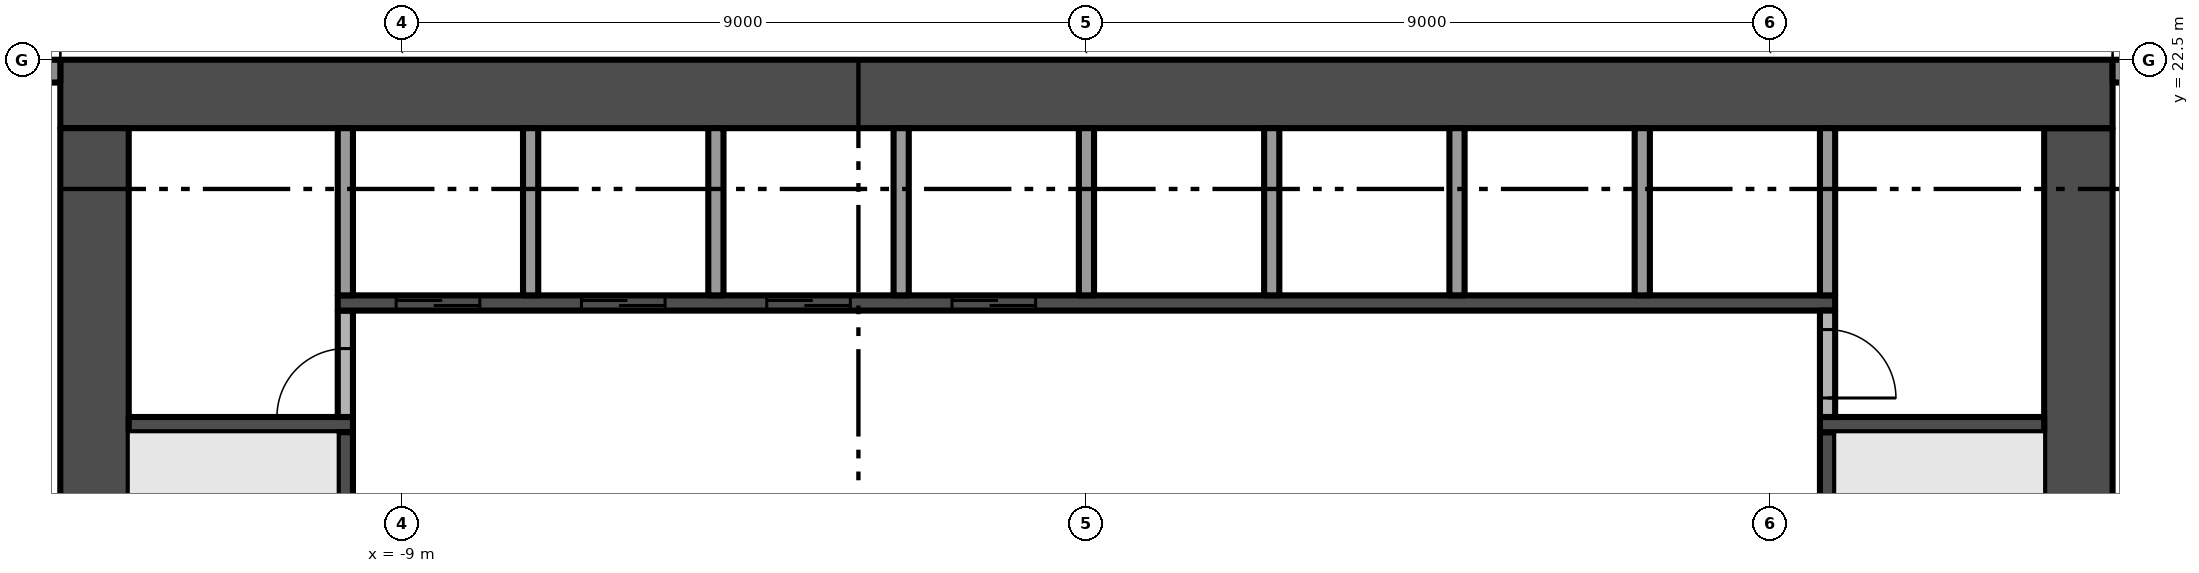
"""IFC4 building model, lengths in metres.
Left out: names, types, materials, properties, quantities, classifications, styles, units other than length and angle.
Written with IfcOpenShell. Run it as: python <this file> out.ifc"""

import sys

from ifc_helpers import new_model, si_unit, direction, frame, frame_2d, origin, place, context, subcontext, project, spatial, rectangle, extrude, element, fill, save


model = new_model("IFC4")
c1 = context("Model", 3, precision=1e-05, world=origin(), true_north=direction((0.0, 1.0)))
c2 = subcontext(c1, "Body", "Model", "MODEL_VIEW")
j1 = project(units=[si_unit("LENGTHUNIT", "METRE"), si_unit("PLANEANGLEUNIT", "RADIAN")], contexts=[c1])
p1 = place(None, origin())
s1 = spatial("IfcSite", under=j1, at=p1, CompositionType="ELEMENT")
p2 = place(p1, origin())
s2 = spatial("IfcBuilding", under=s1, at=p2, CompositionType="ELEMENT")
p3 = place(p2, frame((0.0, 0.0, 96.0)))
s3 = spatial("IfcBuildingStorey", under=s2, at=p3, CompositionType="ELEMENT", Elevation=96.0)
p4 = place(p3, frame((13.05, 5.4, -0.3), z_axis=(0.0, 0.0, 1.0), x_axis=(0.0, 1.0, 0.0)))
e1 = element("IfcWall", 1, at=p4, inside=s3, PredefinedType="SHEAR", context=c2, shape_type="SweptSolid", body=[
    extrude(rectangle(XDim=16.2, YDim=0.9, at=frame_2d((8.1, 0.0))), origin(), (0.0, 0.0, 1.0), 3.8),
])
p5 = place(p4, frame((6.0, 0.0, 0.3)))
e2 = element("IfcOpeningElement", 2, at=p5, cuts=e1, PredefinedType="OPENING", context=c2, shape_type="SweptSolid", body=[
    extrude(rectangle(XDim=1.2, YDim=2.2, at=frame_2d((0.6, 1.1))), frame((0.0, 0.46, 0.0), z_axis=(0.0, -1.0, 0.0), x_axis=(1.0, 0.0, 0.0)), (0.0, 0.0, 1.0), 0.92),
])
p6 = place(p3, frame((13.5, 22.05, -0.3), z_axis=(0.0, 0.0, 1.0), x_axis=(-1.0, 0.0, 0.0)))
e3 = element("IfcWall", 3, at=p6, inside=s3, PredefinedType="SHEAR", context=c2, shape_type="SweptSolid", body=[
    extrude(rectangle(XDim=27.0, YDim=0.9, at=frame_2d((13.5, 0.0))), origin(), (0.0, 0.0, 1.0), 3.8),
])
p7 = place(p3, frame((-13.05, 21.6, -0.3), z_axis=(0.0, 0.0, 1.0), x_axis=(0.0, -1.0, 0.0)))
e4 = element("IfcWall", 4, at=p7, inside=s3, PredefinedType="SHEAR", context=c2, shape_type="SweptSolid", body=[
    extrude(rectangle(XDim=16.2, YDim=0.9, at=frame_2d((8.1, 0.0))), origin(), (0.0, 0.0, 1.0), 3.8),
])
p8 = place(p7, frame((9.0, 0.0, 0.3)))
e5 = element("IfcOpeningElement", 5, at=p8, cuts=e4, PredefinedType="OPENING", context=c2, shape_type="SweptSolid", body=[
    extrude(rectangle(XDim=1.2, YDim=2.2, at=frame_2d((0.6, 1.1))), frame((0.0, 0.46, 0.0), z_axis=(0.0, -1.0, 0.0), x_axis=(1.0, 0.0, 0.0)), (0.0, 0.0, 1.0), 0.92),
])
p9 = place(p3, frame((13.5, 22.35, 0.0), z_axis=(0.0, 0.0, 1.0), x_axis=(1.0, 0.0, 0.0)))
e6 = element("IfcWall", 6, at=p9, inside=s3, PredefinedType="SOLIDWALL", context=c2, shape_type="SweptSolid", body=[
    extrude(rectangle(XDim=3.85, YDim=0.3, at=frame_2d((1.925, 0.0))), origin(), (0.0, 0.0, 1.0), 3.5),
])
p10 = place(p9, frame((0.775, 0.0, 0.0)))
e7 = element("IfcOpeningElement", 7, at=p10, cuts=e6, PredefinedType="OPENING", context=c2, shape_type="SweptSolid", body=[
    extrude(rectangle(XDim=2.775, YDim=2.4, at=frame_2d((1.387, 1.2))), frame((0.0, 0.16, 0.0), z_axis=(0.0, -1.0, 0.0), x_axis=(1.0, 0.0, 0.0)), (0.0, 0.0, 1.0), 0.32),
])
p11 = place(p3, frame((-17.35, 22.35, 0.0), z_axis=(0.0, 0.0, 1.0), x_axis=(1.0, 0.0, 0.0)))
e8 = element("IfcWall", 8, at=p11, inside=s3, PredefinedType="SOLIDWALL", context=c2, shape_type="SweptSolid", body=[
    extrude(rectangle(XDim=3.85, YDim=0.3, at=frame_2d((1.925, 0.0))), origin(), (0.0, 0.0, 1.0), 3.5),
])
p12 = place(p11, frame((0.3, 0.0, 0.45)))
e9 = element("IfcOpeningElement", 9, at=p12, cuts=e8, PredefinedType="OPENING", context=c2, shape_type="SweptSolid", body=[
    extrude(rectangle(XDim=2.775, YDim=2.65, at=frame_2d((1.387, 1.325))), frame((0.0, 0.16, 0.0), z_axis=(0.0, -1.0, 0.0), x_axis=(1.0, 0.0, 0.0)), (0.0, 0.0, 1.0), 0.32),
])
p13 = place(p3, frame((-12.6, 17.7, 0.0), z_axis=(0.0, 0.0, 1.0), x_axis=(1.0, 0.0, 0.0)))
e10 = element("IfcWall", 10, at=p13, inside=s3, PredefinedType="SHEAR", context=c2, shape_type="SweptSolid", body=[
    extrude(rectangle(XDim=2.95, YDim=0.2, at=frame_2d((1.475, 0.0))), origin(), (0.0, 0.0, 1.0), 3.5),
])
p14 = place(p3, frame((-9.75, 16.1, 0.0), z_axis=(0.0, 0.0, 1.0), x_axis=(0.0, 1.0, 0.0)))
e11 = element("IfcWall", 11, at=p14, inside=s3, PredefinedType="SHEAR", context=c2, shape_type="SweptSolid", body=[
    extrude(rectangle(XDim=1.5, YDim=0.2, at=frame_2d((0.75, 0.0))), origin(), (0.0, 0.0, 1.0), 3.5),
])
p15 = place(p3, frame((-9.75, 17.8, 0.0), z_axis=(0.0, 0.0, 1.0), x_axis=(0.0, 1.0, 0.0)))
e12 = element("IfcWall", 12, at=p15, inside=s3, PredefinedType="PARTITIONING", context=c2, shape_type="SweptSolid", body=[
    extrude(rectangle(XDim=1.4, YDim=0.2, at=frame_2d((0.7, 0.0))), origin(), (0.0, 0.0, 1.0), 3.5),
])
p16 = place(p15, origin())
e13 = element("IfcOpeningElement", 13, at=p16, cuts=e12, PredefinedType="OPENING", context=c2, shape_type="SweptSolid", body=[
    extrude(rectangle(XDim=0.9, YDim=2.1, at=frame_2d((0.45, 1.05))), frame((0.0, 0.11, 0.0), z_axis=(0.0, -1.0, 0.0), x_axis=(1.0, 0.0, 0.0)), (0.0, 0.0, 1.0), 0.22),
])
p17 = place(p3, frame((-9.85, 19.3, 0.0), z_axis=(0.0, 0.0, 1.0), x_axis=(1.0, 0.0, 0.0)))
e14 = element("IfcWall", 14, at=p17, inside=s3, PredefinedType="SHEAR", context=c2, shape_type="SweptSolid", body=[
    extrude(rectangle(XDim=19.7, YDim=0.2, at=frame_2d((9.85, 0.0))), origin(), (0.0, 0.0, 1.0), 3.5),
])
p18 = place(p17, frame((0.769, 0.0, 0.0)))
e15 = element("IfcOpeningElement", 15, at=p18, cuts=e14, PredefinedType="OPENING", context=c2, shape_type="SweptSolid", body=[
    extrude(rectangle(XDim=1.1, YDim=2.1, at=frame_2d((0.55, 1.05))), frame((0.0, 0.11, 0.0), z_axis=(0.0, -1.0, 0.0), x_axis=(1.0, 0.0, 0.0)), (0.0, 0.0, 1.0), 0.22),
])
p19 = place(p17, frame((3.206, 0.0, 0.0)))
e16 = element("IfcOpeningElement", 16, at=p19, cuts=e14, PredefinedType="OPENING", context=c2, shape_type="SweptSolid", body=[
    extrude(rectangle(XDim=1.1, YDim=2.1, at=frame_2d((0.55, 1.05))), frame((0.0, 0.11, 0.0), z_axis=(0.0, -1.0, 0.0), x_axis=(1.0, 0.0, 0.0)), (0.0, 0.0, 1.0), 0.22),
])
p20 = place(p17, frame((5.644, 0.0, 0.0)))
e17 = element("IfcOpeningElement", 17, at=p20, cuts=e14, PredefinedType="OPENING", context=c2, shape_type="SweptSolid", body=[
    extrude(rectangle(XDim=1.1, YDim=2.1, at=frame_2d((0.55, 1.05))), frame((0.0, 0.11, 0.0), z_axis=(0.0, -1.0, 0.0), x_axis=(1.0, 0.0, 0.0)), (0.0, 0.0, 1.0), 0.22),
])
p21 = place(p17, frame((8.081, 0.0, 0.0)))
e18 = element("IfcOpeningElement", 18, at=p21, cuts=e14, PredefinedType="OPENING", context=c2, shape_type="SweptSolid", body=[
    extrude(rectangle(XDim=1.1, YDim=2.1, at=frame_2d((0.55, 1.05))), frame((0.0, 0.11, 0.0), z_axis=(0.0, -1.0, 0.0), x_axis=(1.0, 0.0, 0.0)), (0.0, 0.0, 1.0), 0.22),
])
for number, where, z_axis, x_axis in (
    (19, (-9.75, 19.4, 0.0), (0.0, 0.0, 1.0), (0.0, 1.0, 0.0)),
    (20, (-7.312, 19.4, 0.0), (0.0, 0.0, 1.0), (0.0, 1.0, 0.0)),
    (21, (-4.875, 19.4, 0.0), (0.0, 0.0, 1.0), (0.0, 1.0, 0.0)),
    (22, (-2.438, 19.4, 0.0), (0.0, 0.0, 1.0), (0.0, 1.0, 0.0)),
    (23, (0.0, 19.4, 0.0), (0.0, 0.0, 1.0), (0.0, 1.0, 0.0)),
    (24, (2.438, 19.4, 0.0), (0.0, 0.0, 1.0), (0.0, 1.0, 0.0)),
    (25, (4.875, 19.4, 0.0), (0.0, 0.0, 1.0), (0.0, 1.0, 0.0)),
    (26, (7.312, 19.4, 0.0), (0.0, 0.0, 1.0), (0.0, 1.0, 0.0)),
):
    element("IfcWall", number, at=place(p3, frame(where, z_axis=z_axis, x_axis=x_axis)), inside=s3, PredefinedType="PARTITIONING", context=c2, shape_type="SweptSolid", body=[
        extrude(rectangle(XDim=2.2, YDim=0.2, at=frame_2d((1.1, 0.0))), origin(), (0.0, 0.0, 1.0), 3.5),
    ])
p22 = place(p3, frame((9.75, 16.1, 0.0), z_axis=(0.0, 0.0, 1.0), x_axis=(0.0, 1.0, 0.0)))
e27 = element("IfcWall", 27, at=p22, inside=s3, PredefinedType="SHEAR", context=c2, shape_type="SweptSolid", body=[
    extrude(rectangle(XDim=1.5, YDim=0.2, at=frame_2d((0.75, 0.0))), origin(), (0.0, 0.0, 1.0), 3.5),
])
p23 = place(p3, frame((9.65, 17.7, 0.0), z_axis=(0.0, 0.0, 1.0), x_axis=(1.0, 0.0, 0.0)))
e28 = element("IfcWall", 28, at=p23, inside=s3, PredefinedType="SHEAR", context=c2, shape_type="SweptSolid", body=[
    extrude(rectangle(XDim=2.95, YDim=0.2, at=frame_2d((1.475, 0.0))), origin(), (0.0, 0.0, 1.0), 3.5),
])
p24 = place(p3, frame((9.75, 19.2, 0.0), z_axis=(0.0, 0.0, 1.0), x_axis=(0.0, -1.0, 0.0)))
e29 = element("IfcWall", 29, at=p24, inside=s3, PredefinedType="PARTITIONING", context=c2, shape_type="SweptSolid", body=[
    extrude(rectangle(XDim=1.4, YDim=0.2, at=frame_2d((0.7, 0.0))), origin(), (0.0, 0.0, 1.0), 3.5),
])
p25 = place(p24, frame((0.25, 0.0, 0.0)))
e30 = element("IfcOpeningElement", 30, at=p25, cuts=e29, PredefinedType="OPENING", context=c2, shape_type="SweptSolid", body=[
    extrude(rectangle(XDim=0.9, YDim=2.1, at=frame_2d((0.45, 1.05))), frame((0.0, 0.11, 0.0), z_axis=(0.0, -1.0, 0.0), x_axis=(1.0, 0.0, 0.0)), (0.0, 0.0, 1.0), 0.22),
])
p26 = place(p3, frame((9.75, 19.4, 0.0), z_axis=(0.0, 0.0, 1.0), x_axis=(0.0, 1.0, 0.0)))
e31 = element("IfcWall", 31, at=p26, inside=s3, PredefinedType="PARTITIONING", context=c2, shape_type="SweptSolid", body=[
    extrude(rectangle(XDim=2.2, YDim=0.2, at=frame_2d((1.1, 0.0))), origin(), (0.0, 0.0, 1.0), 3.5),
])
p27 = place(p18, origin())
e32 = element("IfcDoor", 32, at=p27, inside=s3, OperationType="SLIDING_TO_LEFT", PredefinedType="DOOR", context=c2, shape_type="SweptSolid", body=[
    extrude(rectangle(XDim=1.1, YDim=2.1, at=frame_2d((0.55, 1.05))), frame((0.0, 0.025, 0.0), z_axis=(0.0, -1.0, 0.0), x_axis=(1.0, 0.0, 0.0)), (0.0, 0.0, 1.0), 0.05),
])
fill(e15, e32)
p28 = place(p19, origin())
e33 = element("IfcDoor", 33, at=p28, inside=s3, OperationType="SLIDING_TO_LEFT", PredefinedType="DOOR", context=c2, shape_type="SweptSolid", body=[
    extrude(rectangle(XDim=1.1, YDim=2.1, at=frame_2d((0.55, 1.05))), frame((0.0, 0.025, 0.0), z_axis=(0.0, -1.0, 0.0), x_axis=(1.0, 0.0, 0.0)), (0.0, 0.0, 1.0), 0.05),
])
fill(e16, e33)
p29 = place(p20, origin())
e34 = element("IfcDoor", 34, at=p29, inside=s3, OperationType="SLIDING_TO_LEFT", PredefinedType="DOOR", context=c2, shape_type="SweptSolid", body=[
    extrude(rectangle(XDim=1.1, YDim=2.1, at=frame_2d((0.55, 1.05))), frame((0.0, 0.025, 0.0), z_axis=(0.0, -1.0, 0.0), x_axis=(1.0, 0.0, 0.0)), (0.0, 0.0, 1.0), 0.05),
])
fill(e17, e34)
p30 = place(p21, origin())
e35 = element("IfcDoor", 35, at=p30, inside=s3, OperationType="SLIDING_TO_LEFT", PredefinedType="DOOR", context=c2, shape_type="SweptSolid", body=[
    extrude(rectangle(XDim=1.1, YDim=2.1, at=frame_2d((0.55, 1.05))), frame((0.0, 0.025, 0.0), z_axis=(0.0, -1.0, 0.0), x_axis=(1.0, 0.0, 0.0)), (0.0, 0.0, 1.0), 0.05),
])
fill(e18, e35)
p31 = place(p16, origin())
e36 = element("IfcDoor", 36, at=p31, inside=s3, OperationType="SINGLE_SWING_LEFT", PredefinedType="DOOR", context=c2, shape_type="SweptSolid", body=[
    extrude(rectangle(XDim=0.9, YDim=2.1, at=frame_2d((0.45, 1.05))), frame((0.0, 0.025, 0.0), z_axis=(0.0, -1.0, 0.0), x_axis=(1.0, 0.0, 0.0)), (0.0, 0.0, 1.0), 0.05),
])
fill(e13, e36)
p32 = place(p25, origin())
e37 = element("IfcDoor", 37, at=p32, inside=s3, OperationType="SINGLE_SWING_RIGHT", PredefinedType="DOOR", context=c2, shape_type="SweptSolid", body=[
    extrude(rectangle(XDim=0.9, YDim=2.1, at=frame_2d((0.45, 1.05))), frame((0.0, 0.025, 0.0), z_axis=(0.0, -1.0, 0.0), x_axis=(1.0, 0.0, 0.0)), (0.0, 0.0, 1.0), 0.05),
])
fill(e30, e37)
save(model, sys.argv[1])
